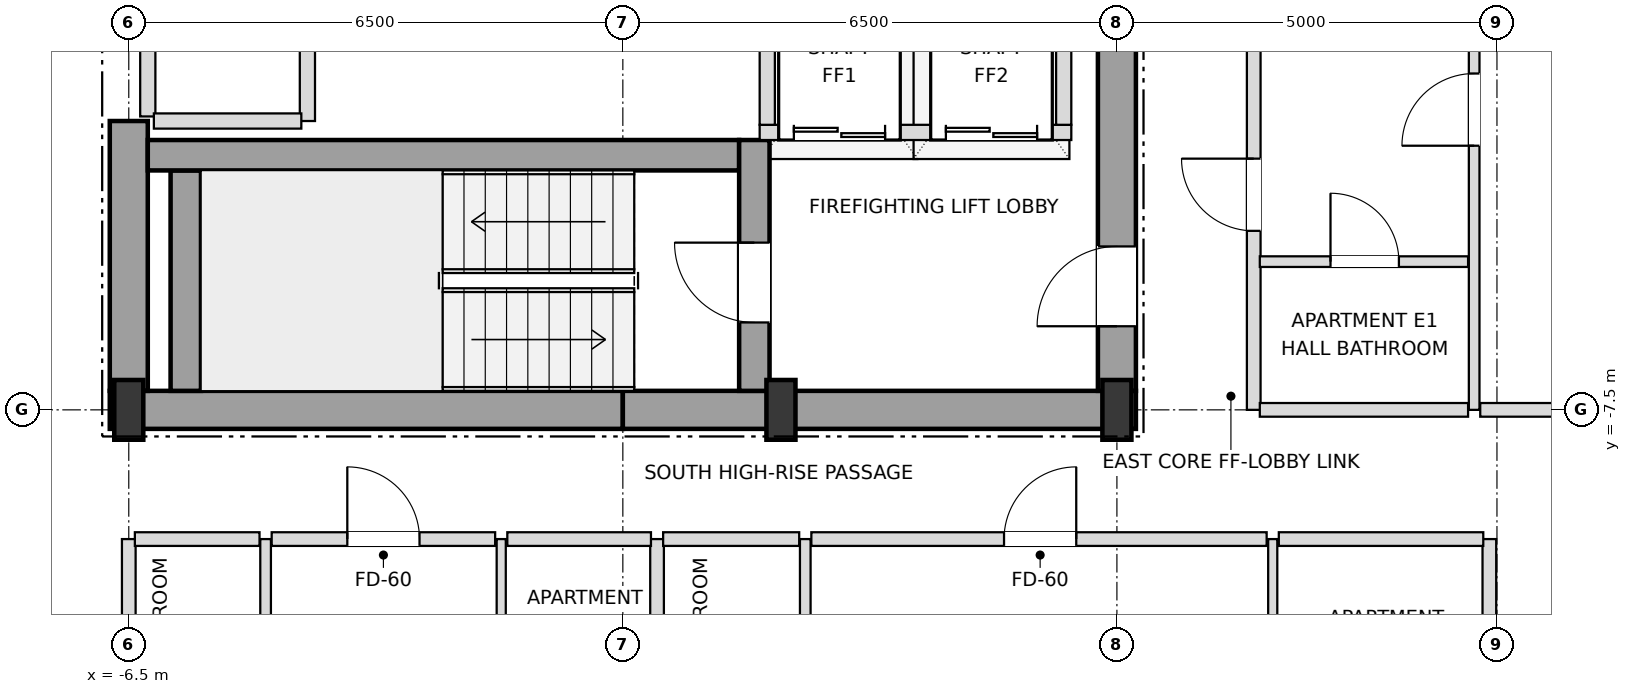
"""IFC4 building model, lengths in metres.
Left out: names, types, materials, properties, quantities, classifications, styles, units other than length and angle.
Written with IfcOpenShell. Run it as: python <this file> out.ifc"""

import sys

from ifc_helpers import new_model, si_unit, direction, frame, frame_2d, origin, origin_2d, place, context, subcontext, project, spatial, rectangle, i_section, extrude, element, fill, save


model = new_model("IFC4")
c1 = context("Model", 3, precision=1e-05, world=origin(), true_north=direction((0.0, 1.0)))
c2 = subcontext(c1, "Body", "Model", "MODEL_VIEW")
j1 = project(units=[si_unit("LENGTHUNIT", "METRE"), si_unit("PLANEANGLEUNIT", "RADIAN")], contexts=[c1])
p1 = place(None, origin())
s1 = spatial("IfcSite", under=j1, at=p1, CompositionType="ELEMENT")
p2 = place(p1, origin())
s2 = spatial("IfcBuilding", under=s1, at=p2, CompositionType="ELEMENT")
p3 = place(p2, frame((0.0, 0.0, 225.9)))
s3 = spatial("IfcBuildingStorey", under=s2, at=p3, CompositionType="ELEMENT", Elevation=225.9)
for number, where, z_axis, x_axis in (
    (1, (-6.5, -7.5, 0.0), (0.0, 0.0, 1.0), (1.0, 0.0, 0.0)),
    (2, (2.08, -7.5, 0.0), (0.0, 0.0, 1.0), (1.0, 0.0, 0.0)),
    (3, (6.5, -7.5, 0.0), (0.0, 0.0, 1.0), (1.0, 0.0, 0.0)),
):
    element("IfcColumn", number, at=place(p3, frame(where, z_axis=z_axis, x_axis=x_axis)), inside=s3, PredefinedType="COLUMN", context=c2, shape_type="SweptSolid", body=[
        extrude(i_section(OverallWidth=0.382, OverallDepth=0.786, WebThickness=0.02, FlangeThickness=0.033, at=origin_2d()), origin(), (0.0, 0.0, 1.0), 3.6),
    ])
for number, where, z_axis, x_axis in (
    (4, (-6.75, -7.5, 0.0), (0.0, 0.0, 1.0), (1.0, 0.0, 0.0)),
    (5, (0.0, -7.5, 0.0), (0.0, 0.0, 1.0), (1.0, 0.0, 0.0)),
):
    element("IfcWall", number, at=place(p3, frame(where, z_axis=z_axis, x_axis=x_axis)), inside=s3, PredefinedType="SHEAR", context=c2, shape_type="SweptSolid", body=[
        extrude(rectangle(XDim=6.75, YDim=0.5, at=frame_2d((3.375, 0.0))), origin(), (0.0, 0.0, 1.0), 3.38),
    ])
p4 = place(p3, frame((-6.5, -7.25, 0.0), z_axis=(0.0, 0.0, 1.0), x_axis=(0.0, 1.0, 0.0)))
e6 = element("IfcWall", 6, at=p4, inside=s3, PredefinedType="SHEAR", context=c2, shape_type="SweptSolid", body=[
    extrude(rectangle(XDim=3.55, YDim=0.5, at=frame_2d((1.775, 0.0))), origin(), (0.0, 0.0, 1.0), 3.38),
])
p5 = place(p3, frame((6.5, -7.25, 0.0), z_axis=(0.0, 0.0, 1.0), x_axis=(0.0, 1.0, 0.0)))
e7 = element("IfcWall", 7, at=p5, inside=s3, PredefinedType="SHEAR", context=c2, shape_type="SweptSolid", body=[
    extrude(rectangle(XDim=5.75, YDim=0.5, at=frame_2d((2.875, 0.0))), origin(), (0.0, 0.0, 1.0), 3.38),
])
p6 = place(p5, frame((0.85, 0.0, 0.0)))
e8 = element("IfcOpeningElement", 8, at=p6, cuts=e7, PredefinedType="OPENING", context=c2, shape_type="SweptSolid", body=[
    extrude(rectangle(XDim=1.05, YDim=2.15, at=frame_2d((0.525, 1.075))), frame((0.0, 0.26, 0.0), z_axis=(0.0, -1.0, 0.0), x_axis=(1.0, 0.0, 0.0)), (0.0, 0.0, 1.0), 0.52),
])
p7 = place(p3, frame((-5.75, -7.25, 0.0), z_axis=(0.0, 0.0, 1.0), x_axis=(0.0, 1.0, 0.0)))
e9 = element("IfcWall", 9, at=p7, inside=s3, PredefinedType="SHEAR", context=c2, shape_type="SweptSolid", body=[
    extrude(rectangle(XDim=2.9, YDim=0.4, at=frame_2d((1.45, 0.0))), origin(), (0.0, 0.0, 1.0), 3.38),
])
p8 = place(p3, frame((-6.25, -4.15, 0.0), z_axis=(0.0, 0.0, 1.0), x_axis=(1.0, 0.0, 0.0)))
e10 = element("IfcWall", 10, at=p8, inside=s3, PredefinedType="SHEAR", context=c2, shape_type="SweptSolid", body=[
    extrude(rectangle(XDim=7.78, YDim=0.4, at=frame_2d((3.89, 0.0))), origin(), (0.0, 0.0, 1.0), 3.38),
])
p9 = place(p3, frame((1.73, -7.25, 0.0), z_axis=(0.0, 0.0, 1.0), x_axis=(0.0, 1.0, 0.0)))
e11 = element("IfcWall", 11, at=p9, inside=s3, PredefinedType="SHEAR", context=c2, shape_type="SweptSolid", body=[
    extrude(rectangle(XDim=3.3, YDim=0.4, at=frame_2d((1.65, 0.0))), origin(), (0.0, 0.0, 1.0), 3.38),
])
p10 = place(p9, frame((0.9, 0.0, 0.0)))
e12 = element("IfcOpeningElement", 12, at=p10, cuts=e11, PredefinedType="OPENING", context=c2, shape_type="SweptSolid", body=[
    extrude(rectangle(XDim=1.05, YDim=2.15, at=frame_2d((0.525, 1.075))), frame((0.0, 0.21, 0.0), z_axis=(0.0, -1.0, 0.0), x_axis=(1.0, 0.0, 0.0)), (0.0, 0.0, 1.0), 0.42),
])
p11 = place(p3, frame((1.8, -3.85, 0.0), z_axis=(0.0, 0.0, 1.0), x_axis=(1.0, 0.0, 0.0)))
e13 = element("IfcWall", 13, at=p11, inside=s3, PredefinedType="SOLIDWALL", context=c2, shape_type="SweptSolid", body=[
    extrude(rectangle(XDim=4.1, YDim=0.2, at=frame_2d((2.05, 0.0))), origin(), (0.0, 0.0, 1.0), 3.38),
])
p12 = place(p11, frame((0.45, 0.0, 0.0)))
e14 = element("IfcOpeningElement", 14, at=p12, cuts=e13, PredefinedType="OPENING", context=c2, shape_type="SweptSolid", body=[
    extrude(rectangle(XDim=1.2, YDim=2.2, at=frame_2d((0.6, 1.1))), frame((0.0, 0.11, 0.0), z_axis=(0.0, -1.0, 0.0), x_axis=(1.0, 0.0, 0.0)), (0.0, 0.0, 1.0), 0.22),
])
p13 = place(p11, frame((2.45, 0.0, 0.0)))
e15 = element("IfcOpeningElement", 15, at=p13, cuts=e13, PredefinedType="OPENING", context=c2, shape_type="SweptSolid", body=[
    extrude(rectangle(XDim=1.2, YDim=2.2, at=frame_2d((0.6, 1.1))), frame((0.0, 0.11, 0.0), z_axis=(0.0, -1.0, 0.0), x_axis=(1.0, 0.0, 0.0)), (0.0, 0.0, 1.0), 0.22),
])
for number, where, z_axis, x_axis in (
    (16, (1.9, -3.75, 0.0), (0.0, 0.0, 1.0), (0.0, 1.0, 0.0)),
    (17, (5.8, -3.75, 0.0), (0.0, 0.0, 1.0), (0.0, 1.0, 0.0)),
):
    element("IfcWall", number, at=place(p3, frame(where, z_axis=z_axis, x_axis=x_axis)), inside=s3, PredefinedType="SOLIDWALL", context=c2, shape_type="SweptSolid", body=[
        extrude(rectangle(XDim=2.0, YDim=0.2, at=frame_2d((1.0, 0.0))), origin(), (0.0, 0.0, 1.0), 3.38),
    ])
p14 = place(p3, frame((-6.5, -19.9, 0.0), z_axis=(0.0, 0.0, 1.0), x_axis=(0.0, 1.0, 0.0)))
e18 = element("IfcWall", 18, at=p14, inside=s3, PredefinedType="PARTITIONING", context=c2, shape_type="SweptSolid", body=[
    extrude(rectangle(XDim=10.7, YDim=0.18, at=frame_2d((5.35, 0.0))), origin(), (0.0, 0.0, 1.0), 2.826),
])
p15 = place(p3, frame((-6.25, -3.64, 0.0), z_axis=(0.0, 0.0, 1.0), x_axis=(0.0, 1.0, 0.0)))
e19 = element("IfcWall", 19, at=p15, inside=s3, PredefinedType="SOLIDWALL", context=c2, shape_type="SweptSolid", body=[
    extrude(rectangle(XDim=7.34, YDim=0.2, at=frame_2d((3.67, 0.0))), origin(), (0.0, 0.0, 1.0), 3.38),
])
p16 = place(p3, frame((-4.7, -13.9, 0.0), z_axis=(0.0, 0.0, 1.0), x_axis=(0.0, 1.0, 0.0)))
e20 = element("IfcWall", 20, at=p16, inside=s3, PredefinedType="PARTITIONING", context=c2, shape_type="SweptSolid", body=[
    extrude(rectangle(XDim=4.7, YDim=0.14, at=frame_2d((2.35, 0.0))), origin(), (0.0, 0.0, 1.0), 3.38),
])
p17 = place(p16, frame((1.9, 0.0, 0.0)))
e21 = element("IfcOpeningElement", 21, at=p17, cuts=e20, PredefinedType="OPENING", context=c2, shape_type="SweptSolid", body=[
    extrude(rectangle(XDim=0.9, YDim=2.1, at=frame_2d((0.45, 1.05))), frame((0.0, 0.08, 0.0), z_axis=(0.0, -1.0, 0.0), x_axis=(1.0, 0.0, 0.0)), (0.0, 0.0, 1.0), 0.16),
])
p18 = place(p3, frame((-4.15, -3.7, 0.0), z_axis=(0.0, 0.0, 1.0), x_axis=(0.0, 1.0, 0.0)))
e22 = element("IfcWall", 22, at=p18, inside=s3, PredefinedType="SOLIDWALL", context=c2, shape_type="SweptSolid", body=[
    extrude(rectangle(XDim=7.4, YDim=0.2, at=frame_2d((3.7, 0.0))), origin(), (0.0, 0.0, 1.0), 3.38),
])
p19 = place(p18, frame((2.025, 0.0, 0.0)))
e23 = element("IfcOpeningElement", 23, at=p19, cuts=e22, PredefinedType="OPENING", context=c2, shape_type="SweptSolid", body=[
    extrude(rectangle(XDim=0.95, YDim=2.15, at=frame_2d((0.475, 1.075))), frame((0.0, 0.11, 0.0), z_axis=(0.0, -1.0, 0.0), x_axis=(1.0, 0.0, 0.0)), (0.0, 0.0, 1.0), 0.22),
])
p20 = place(p3, frame((-1.6, -13.9, 0.0), z_axis=(0.0, 0.0, 1.0), x_axis=(0.0, 1.0, 0.0)))
e24 = element("IfcWall", 24, at=p20, inside=s3, PredefinedType="PARTITIONING", context=c2, shape_type="SweptSolid", body=[
    extrude(rectangle(XDim=4.7, YDim=0.12, at=frame_2d((2.35, 0.0))), origin(), (0.0, 0.0, 1.0), 3.38),
])
p21 = place(p20, frame((1.875, 0.0, 0.0)))
e25 = element("IfcOpeningElement", 25, at=p21, cuts=e24, PredefinedType="OPENING", context=c2, shape_type="SweptSolid", body=[
    extrude(rectangle(XDim=0.95, YDim=2.1, at=frame_2d((0.475, 1.05))), frame((0.0, 0.07, 0.0), z_axis=(0.0, -1.0, 0.0), x_axis=(1.0, 0.0, 0.0)), (0.0, 0.0, 1.0), 0.14),
])
p22 = place(p3, frame((0.45, -19.9, 0.0), z_axis=(0.0, 0.0, 1.0), x_axis=(0.0, 1.0, 0.0)))
e26 = element("IfcWall", 26, at=p22, inside=s3, PredefinedType="PARTITIONING", context=c2, shape_type="SweptSolid", body=[
    extrude(rectangle(XDim=10.7, YDim=0.18, at=frame_2d((5.35, 0.0))), origin(), (0.0, 0.0, 1.0), 3.018),
])
p23 = place(p3, frame((2.4, -13.9, 0.0), z_axis=(0.0, 0.0, 1.0), x_axis=(0.0, 1.0, 0.0)))
e27 = element("IfcWall", 27, at=p23, inside=s3, PredefinedType="PARTITIONING", context=c2, shape_type="SweptSolid", body=[
    extrude(rectangle(XDim=4.7, YDim=0.14, at=frame_2d((2.35, 0.0))), origin(), (0.0, 0.0, 1.0), 3.38),
])
p24 = place(p23, frame((1.9, 0.0, 0.0)))
e28 = element("IfcOpeningElement", 28, at=p24, cuts=e27, PredefinedType="OPENING", context=c2, shape_type="SweptSolid", body=[
    extrude(rectangle(XDim=0.9, YDim=2.1, at=frame_2d((0.45, 1.05))), frame((0.0, 0.08, 0.0), z_axis=(0.0, -1.0, 0.0), x_axis=(1.0, 0.0, 0.0)), (0.0, 0.0, 1.0), 0.16),
])
p25 = place(p3, frame((8.3, -7.5, 0.0), z_axis=(0.0, 0.0, 1.0), x_axis=(0.0, 1.0, 0.0)))
e29 = element("IfcWall", 29, at=p25, inside=s3, PredefinedType="PARTITIONING", context=c2, shape_type="SweptSolid", body=[
    extrude(rectangle(XDim=15.0, YDim=0.18, at=frame_2d((7.5, 0.0))), origin(), (0.0, 0.0, 1.0), 3.38),
])
p26 = place(p25, frame((2.355, 0.0, 0.0)))
e30 = element("IfcOpeningElement", 30, at=p26, cuts=e29, PredefinedType="OPENING", context=c2, shape_type="SweptSolid", body=[
    extrude(rectangle(XDim=0.95, YDim=2.15, at=frame_2d((0.475, 1.075))), frame((0.0, 0.1, 0.0), z_axis=(0.0, -1.0, 0.0), x_axis=(1.0, 0.0, 0.0)), (0.0, 0.0, 1.0), 0.2),
])
p27 = place(p3, frame((8.55, -19.9, 0.0), z_axis=(0.0, 0.0, 1.0), x_axis=(0.0, 1.0, 0.0)))
e31 = element("IfcWall", 31, at=p27, inside=s3, PredefinedType="PARTITIONING", context=c2, shape_type="SweptSolid", body=[
    extrude(rectangle(XDim=10.7, YDim=0.12, at=frame_2d((5.35, 0.0))), origin(), (0.0, 0.0, 1.0), 2.826),
])
p28 = place(p27, frame((7.875, 0.0, 0.0)))
e32 = element("IfcOpeningElement", 32, at=p28, cuts=e31, PredefinedType="OPENING", context=c2, shape_type="SweptSolid", body=[
    extrude(rectangle(XDim=0.95, YDim=2.1, at=frame_2d((0.475, 1.05))), frame((0.0, 0.07, 0.0), z_axis=(0.0, -1.0, 0.0), x_axis=(1.0, 0.0, 0.0)), (0.0, 0.0, 1.0), 0.14),
])
p29 = place(p27, frame((2.55, 0.0, 0.0)))
e33 = element("IfcOpeningElement", 33, at=p29, cuts=e31, PredefinedType="OPENING", context=c2, shape_type="SweptSolid", body=[
    extrude(rectangle(XDim=0.9, YDim=2.1, at=frame_2d((0.45, 1.05))), frame((0.0, 0.07, 0.0), z_axis=(0.0, -1.0, 0.0), x_axis=(1.0, 0.0, 0.0)), (0.0, 0.0, 1.0), 0.14),
])
p30 = place(p3, frame((11.2, -7.5, 0.0), z_axis=(0.0, 0.0, 1.0), x_axis=(0.0, 1.0, 0.0)))
e34 = element("IfcWall", 34, at=p30, inside=s3, PredefinedType="PARTITIONING", context=c2, shape_type="SweptSolid", body=[
    extrude(rectangle(XDim=15.0, YDim=0.14, at=frame_2d((7.5, 0.0))), origin(), (0.0, 0.0, 1.0), 3.38),
])
p31 = place(p30, frame((3.475, 0.0, 0.0)))
e35 = element("IfcOpeningElement", 35, at=p31, cuts=e34, PredefinedType="OPENING", context=c2, shape_type="SweptSolid", body=[
    extrude(rectangle(XDim=0.95, YDim=2.1, at=frame_2d((0.475, 1.05))), frame((0.0, 0.08, 0.0), z_axis=(0.0, -1.0, 0.0), x_axis=(1.0, 0.0, 0.0)), (0.0, 0.0, 1.0), 0.16),
])
p32 = place(p3, frame((11.4, -14.27, 0.0), z_axis=(0.0, 0.0, 1.0), x_axis=(0.0, 1.0, 0.0)))
e36 = element("IfcWall", 36, at=p32, inside=s3, PredefinedType="PARTITIONING", context=c2, shape_type="SweptSolid", body=[
    extrude(rectangle(XDim=5.07, YDim=0.18, at=frame_2d((2.535, 0.0))), origin(), (0.0, 0.0, 1.0), 2.748),
])
p33 = place(p3, frame((-6.42, -9.2, 0.0), z_axis=(0.0, 0.0, 1.0), x_axis=(1.0, 0.0, 0.0)))
e37 = element("IfcWall", 37, at=p33, inside=s3, PredefinedType="PARTITIONING", context=c2, shape_type="SweptSolid", body=[
    extrude(rectangle(XDim=1.64, YDim=0.18, at=frame_2d((0.82, 0.0))), origin(), (0.0, 0.0, 1.0), 3.38),
])
p34 = place(p3, frame((-4.62, -9.2, 0.0), z_axis=(0.0, 0.0, 1.0), x_axis=(1.0, 0.0, 0.0)))
e38 = element("IfcWall", 38, at=p34, inside=s3, PredefinedType="PARTITIONING", context=c2, shape_type="SweptSolid", body=[
    extrude(rectangle(XDim=2.94, YDim=0.18, at=frame_2d((1.47, 0.0))), origin(), (0.0, 0.0, 1.0), 3.38),
])
p35 = place(p34, frame((0.995, 0.0, 0.0)))
e39 = element("IfcOpeningElement", 39, at=p35, cuts=e38, PredefinedType="OPENING", context=c2, shape_type="SweptSolid", body=[
    extrude(rectangle(XDim=0.95, YDim=2.15, at=frame_2d((0.475, 1.075))), frame((0.0, 0.1, 0.0), z_axis=(0.0, -1.0, 0.0), x_axis=(1.0, 0.0, 0.0)), (0.0, 0.0, 1.0), 0.2),
])
p36 = place(p3, frame((-1.52, -9.2, 0.0), z_axis=(0.0, 0.0, 1.0), x_axis=(1.0, 0.0, 0.0)))
e40 = element("IfcWall", 40, at=p36, inside=s3, PredefinedType="PARTITIONING", context=c2, shape_type="SweptSolid", body=[
    extrude(rectangle(XDim=1.89, YDim=0.18, at=frame_2d((0.945, 0.0))), origin(), (0.0, 0.0, 1.0), 3.38),
])
p37 = place(p3, frame((0.53, -9.2, 0.0), z_axis=(0.0, 0.0, 1.0), x_axis=(1.0, 0.0, 0.0)))
e41 = element("IfcWall", 41, at=p37, inside=s3, PredefinedType="PARTITIONING", context=c2, shape_type="SweptSolid", body=[
    extrude(rectangle(XDim=1.79, YDim=0.18, at=frame_2d((0.895, 0.0))), origin(), (0.0, 0.0, 1.0), 3.38),
])
p38 = place(p3, frame((2.48, -9.2, 0.0), z_axis=(0.0, 0.0, 1.0), x_axis=(1.0, 0.0, 0.0)))
e42 = element("IfcWall", 42, at=p38, inside=s3, PredefinedType="PARTITIONING", context=c2, shape_type="SweptSolid", body=[
    extrude(rectangle(XDim=5.99, YDim=0.18, at=frame_2d((2.995, 0.0))), origin(), (0.0, 0.0, 1.0), 2.826),
])
p39 = place(p38, frame((2.535, 0.0, 0.0)))
e43 = element("IfcOpeningElement", 43, at=p39, cuts=e42, PredefinedType="OPENING", context=c2, shape_type="SweptSolid", body=[
    extrude(rectangle(XDim=0.95, YDim=2.15, at=frame_2d((0.475, 1.075))), frame((0.0, 0.1, 0.0), z_axis=(0.0, -1.0, 0.0), x_axis=(1.0, 0.0, 0.0)), (0.0, 0.0, 1.0), 0.2),
])
p40 = place(p3, frame((8.63, -9.2, 0.0), z_axis=(0.0, 0.0, 1.0), x_axis=(1.0, 0.0, 0.0)))
e44 = element("IfcWall", 44, at=p40, inside=s3, PredefinedType="PARTITIONING", context=c2, shape_type="SweptSolid", body=[
    extrude(rectangle(XDim=2.69, YDim=0.18, at=frame_2d((1.345, 0.0))), origin(), (0.0, 0.0, 1.0), 3.38),
])
p41 = place(p3, frame((8.38, -7.5, 0.0), z_axis=(0.0, 0.0, 1.0), x_axis=(1.0, 0.0, 0.0)))
e45 = element("IfcWall", 45, at=p41, inside=s3, PredefinedType="PARTITIONING", context=c2, shape_type="SweptSolid", body=[
    extrude(rectangle(XDim=2.74, YDim=0.18, at=frame_2d((1.37, 0.0))), origin(), (0.0, 0.0, 1.0), 2.826),
])
p42 = place(p3, frame((11.28, -7.5, 0.0), z_axis=(0.0, 0.0, 1.0), x_axis=(1.0, 0.0, 0.0)))
e46 = element("IfcWall", 46, at=p42, inside=s3, PredefinedType="PARTITIONING", context=c2, shape_type="SweptSolid", body=[
    extrude(rectangle(XDim=5.62, YDim=0.18, at=frame_2d((2.81, 0.0))), origin(), (0.0, 0.0, 1.0), 2.826),
])
p43 = place(p3, frame((8.38, -5.55, 0.0), z_axis=(0.0, 0.0, 1.0), x_axis=(1.0, 0.0, 0.0)))
e47 = element("IfcWall", 47, at=p43, inside=s3, PredefinedType="PARTITIONING", context=c2, shape_type="SweptSolid", body=[
    extrude(rectangle(XDim=2.74, YDim=0.14, at=frame_2d((1.37, 0.0))), origin(), (0.0, 0.0, 1.0), 3.38),
])
p44 = place(p43, frame((0.93, 0.0, 0.0)))
e48 = element("IfcOpeningElement", 48, at=p44, cuts=e47, PredefinedType="OPENING", context=c2, shape_type="SweptSolid", body=[
    extrude(rectangle(XDim=0.9, YDim=2.1, at=frame_2d((0.45, 1.05))), frame((0.0, 0.08, 0.0), z_axis=(0.0, -1.0, 0.0), x_axis=(1.0, 0.0, 0.0)), (0.0, 0.0, 1.0), 0.16),
])
p45 = place(p3, frame((-6.17, -3.7, 0.0), z_axis=(0.0, 0.0, 1.0), x_axis=(1.0, 0.0, 0.0)))
e49 = element("IfcWall", 49, at=p45, inside=s3, PredefinedType="SOLIDWALL", context=c2, shape_type="SweptSolid", body=[
    extrude(rectangle(XDim=1.94, YDim=0.2, at=frame_2d((0.97, 0.0))), origin(), (0.0, 0.0, 1.0), 3.38),
])
p46 = place(p6, origin())
e50 = element("IfcDoor", 50, at=p46, inside=s3, OperationType="SINGLE_SWING_LEFT", PredefinedType="DOOR", context=c2, shape_type="SweptSolid", body=[
    extrude(rectangle(XDim=1.05, YDim=2.15, at=frame_2d((0.525, 1.075))), frame((0.0, 0.025, 0.0), z_axis=(0.0, -1.0, 0.0), x_axis=(1.0, 0.0, 0.0)), (0.0, 0.0, 1.0), 0.05),
])
fill(e8, e50)
p47 = place(p10, origin())
e51 = element("IfcDoor", 51, at=p47, inside=s3, OperationType="SINGLE_SWING_RIGHT", PredefinedType="DOOR", context=c2, shape_type="SweptSolid", body=[
    extrude(rectangle(XDim=1.05, YDim=2.15, at=frame_2d((0.525, 1.075))), frame((0.0, 0.025, 0.0), z_axis=(0.0, -1.0, 0.0), x_axis=(1.0, 0.0, 0.0)), (0.0, 0.0, 1.0), 0.05),
])
fill(e12, e51)
p48 = place(p12, origin())
e52 = element("IfcDoor", 52, at=p48, inside=s3, OperationType="DOUBLE_DOOR_SLIDING", PredefinedType="DOOR", context=c2, shape_type="SweptSolid", body=[
    extrude(rectangle(XDim=1.2, YDim=2.2, at=frame_2d((0.6, 1.1))), frame((0.0, 0.025, 0.0), z_axis=(0.0, -1.0, 0.0), x_axis=(1.0, 0.0, 0.0)), (0.0, 0.0, 1.0), 0.05),
])
fill(e14, e52)
p49 = place(p13, origin())
e53 = element("IfcDoor", 53, at=p49, inside=s3, OperationType="DOUBLE_DOOR_SLIDING", PredefinedType="DOOR", context=c2, shape_type="SweptSolid", body=[
    extrude(rectangle(XDim=1.2, YDim=2.2, at=frame_2d((0.6, 1.1))), frame((0.0, 0.025, 0.0), z_axis=(0.0, -1.0, 0.0), x_axis=(1.0, 0.0, 0.0)), (0.0, 0.0, 1.0), 0.05),
])
fill(e15, e53)
p50 = place(p35, origin())
e54 = element("IfcDoor", 54, at=p50, inside=s3, OperationType="SINGLE_SWING_LEFT", PredefinedType="DOOR", context=c2, shape_type="SweptSolid", body=[
    extrude(rectangle(XDim=0.95, YDim=2.15, at=frame_2d((0.475, 1.075))), frame((0.0, 0.025, 0.0), z_axis=(0.0, -1.0, 0.0), x_axis=(1.0, 0.0, 0.0)), (0.0, 0.0, 1.0), 0.05),
])
fill(e39, e54)
p51 = place(p39, origin())
e55 = element("IfcDoor", 55, at=p51, inside=s3, OperationType="SINGLE_SWING_RIGHT", PredefinedType="DOOR", context=c2, shape_type="SweptSolid", body=[
    extrude(rectangle(XDim=0.95, YDim=2.15, at=frame_2d((0.475, 1.075))), frame((0.0, 0.025, 0.0), z_axis=(0.0, -1.0, 0.0), x_axis=(1.0, 0.0, 0.0)), (0.0, 0.0, 1.0), 0.05),
])
fill(e43, e55)
p52 = place(p44, origin())
e56 = element("IfcDoor", 56, at=p52, inside=s3, OperationType="SINGLE_SWING_LEFT", PredefinedType="DOOR", context=c2, shape_type="SweptSolid", body=[
    extrude(rectangle(XDim=0.9, YDim=2.1, at=frame_2d((0.45, 1.05))), frame((0.0, 0.025, 0.0), z_axis=(0.0, -1.0, 0.0), x_axis=(1.0, 0.0, 0.0)), (0.0, 0.0, 1.0), 0.05),
])
fill(e48, e56)
p53 = place(p26, origin())
e57 = element("IfcDoor", 57, at=p53, inside=s3, OperationType="SINGLE_SWING_RIGHT", PredefinedType="DOOR", context=c2, shape_type="SweptSolid", body=[
    extrude(rectangle(XDim=0.95, YDim=2.15, at=frame_2d((0.475, 1.075))), frame((0.0, 0.025, 0.0), z_axis=(0.0, -1.0, 0.0), x_axis=(1.0, 0.0, 0.0)), (0.0, 0.0, 1.0), 0.05),
])
fill(e30, e57)
p54 = place(p31, origin())
e58 = element("IfcDoor", 58, at=p54, inside=s3, OperationType="SINGLE_SWING_LEFT", PredefinedType="DOOR", context=c2, shape_type="SweptSolid", body=[
    extrude(rectangle(XDim=0.95, YDim=2.1, at=frame_2d((0.475, 1.05))), frame((0.0, 0.025, 0.0), z_axis=(0.0, -1.0, 0.0), x_axis=(1.0, 0.0, 0.0)), (0.0, 0.0, 1.0), 0.05),
])
fill(e35, e58)
save(model, sys.argv[1])
